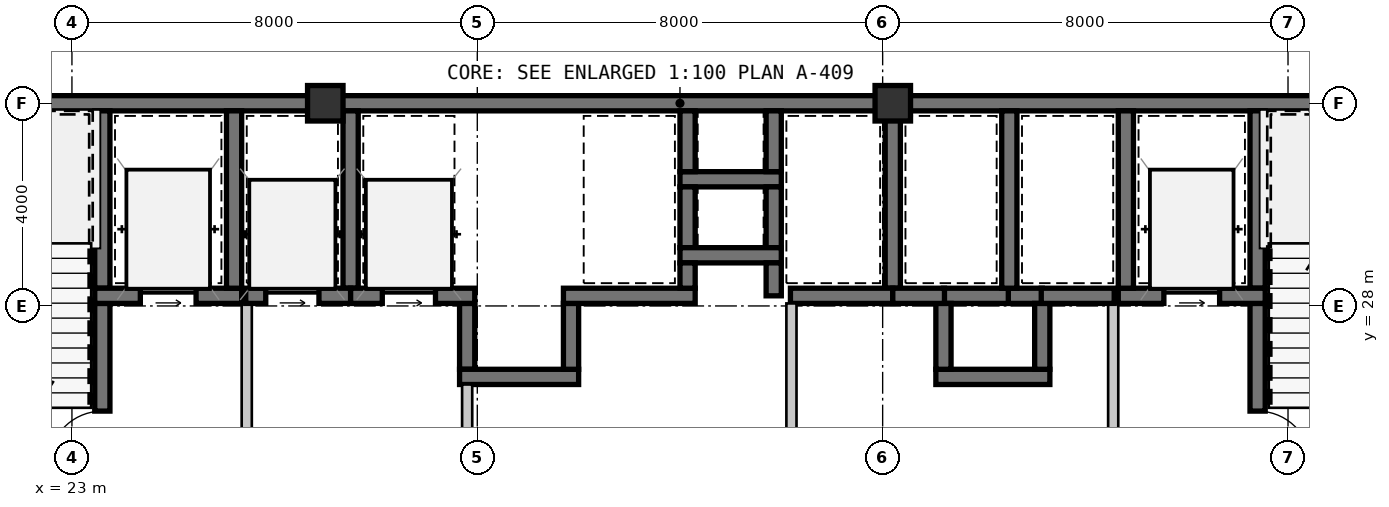
"""IFC4 building model, lengths in metres.
Left out: names, types, materials, properties, quantities, classifications, styles, units other than length and angle.
Written with IfcOpenShell. Run it as: python <this file> out.ifc"""

import sys

from ifc_helpers import new_model, si_unit, direction, frame, frame_2d, origin, origin_2d, place, context, subcontext, project, spatial, rectangle, extrude, source, transform, mapped, element, fill, save


model = new_model("IFC4")
c1 = context("Model", 3, precision=1e-05, world=origin(), true_north=direction((0.0, 1.0)))
c2 = subcontext(c1, "Body", "Model", "MODEL_VIEW")
j1 = project(units=[si_unit("LENGTHUNIT", "METRE"), si_unit("PLANEANGLEUNIT", "RADIAN")], contexts=[c1])
p1 = place(None, origin())
s1 = spatial("IfcSite", under=j1, at=p1, CompositionType="ELEMENT")
p2 = place(p1, origin())
s2 = spatial("IfcBuilding", under=s1, at=p2, CompositionType="ELEMENT")
p3 = place(p2, frame((0.0, 0.0, 106.05)))
s3 = spatial("IfcBuildingStorey", under=s2, at=p3, CompositionType="ELEMENT", Elevation=106.05)
m1 = source(origin(), c2, "Body", "SweptSolid", [
    extrude(rectangle(XDim=0.7, YDim=0.7, at=origin_2d()), origin(), (0.0, 0.0, 1.0), 3.15),
])
for number, where, z_axis, x_axis in (
    (1, (28.0, 32.0, 0.0), (0.0, 0.0, 1.0), (1.0, 0.0, 0.0)),
    (2, (39.2, 32.0, 0.0), (0.0, 0.0, 1.0), (1.0, 0.0, 0.0)),
):
    element("IfcColumn", number, at=place(p3, frame(where, z_axis=z_axis, x_axis=x_axis)), inside=s3, PredefinedType="COLUMN", context=c2, shape_type="MappedRepresentation", body=[
        mapped(m1, transform((0.0, 0.0, 0.0), scale=1.0)),
    ])
m2 = source(origin(), c2, "Body", "SweptSolid", [
    extrude(rectangle(XDim=9.15, YDim=0.3, at=frame_2d((4.575, 0.0))), origin(), (0.0, 0.0, 1.0), 2.93),
])
p4 = place(p3, frame((18.85, 32.0, 0.0), z_axis=(0.0, 0.0, 1.0), x_axis=(1.0, 0.0, 0.0)))
e3 = element("IfcWall", 3, at=p4, inside=s3, PredefinedType="SHEAR", context=c2, shape_type="MappedRepresentation", body=[
    mapped(m2, transform((0.0, 0.0, 0.0), scale=1.0)),
])
m3 = source(origin(), c2, "Body", "SweptSolid", [
    extrude(rectangle(XDim=11.2, YDim=0.3, at=frame_2d((5.6, 0.0))), origin(), (0.0, 0.0, 1.0), 2.93),
])
p5 = place(p3, frame((28.0, 32.0, 0.0), z_axis=(0.0, 0.0, 1.0), x_axis=(1.0, 0.0, 0.0)))
e4 = element("IfcWall", 4, at=p5, inside=s3, PredefinedType="SHEAR", context=c2, shape_type="MappedRepresentation", body=[
    mapped(m3, transform((0.0, 0.0, 0.0), scale=1.0)),
])
m4 = source(origin(), c2, "Body", "SweptSolid", [
    extrude(rectangle(XDim=11.95, YDim=0.3, at=frame_2d((5.975, 0.0))), origin(), (0.0, 0.0, 1.0), 2.93),
])
p6 = place(p3, frame((39.2, 32.0, 0.0), z_axis=(0.0, 0.0, 1.0), x_axis=(1.0, 0.0, 0.0)))
e5 = element("IfcWall", 5, at=p6, inside=s3, PredefinedType="SHEAR", context=c2, shape_type="MappedRepresentation", body=[
    mapped(m4, transform((0.0, 0.0, 0.0), scale=1.0)),
])
m5 = source(origin(), c2, "Body", "SweptSolid", [
    extrude(rectangle(XDim=3.5, YDim=0.3, at=frame_2d((1.75, 0.0))), origin(), (0.0, 0.0, 1.0), 2.93),
])
p7 = place(p3, frame((23.6, 28.35, 0.0), z_axis=(0.0, 0.0, 1.0), x_axis=(0.0, 1.0, 0.0)))
e6 = element("IfcWall", 6, at=p7, inside=s3, PredefinedType="SHEAR", context=c2, shape_type="MappedRepresentation", body=[
    mapped(m5, transform((0.0, 0.0, 0.0), scale=1.0)),
])
m6 = source(origin(), c2, "Body", "SweptSolid", [
    extrude(rectangle(XDim=3.9, YDim=0.3, at=frame_2d((1.95, 0.0))), origin(), (0.0, 0.0, 1.0), 2.93),
])
p8 = place(p3, frame((23.6, 24.15, 0.0), z_axis=(0.0, 0.0, 1.0), x_axis=(0.0, 1.0, 0.0)))
e7 = element("IfcWall", 7, at=p8, inside=s3, PredefinedType="SHEAR", context=c2, shape_type="MappedRepresentation", body=[
    mapped(m6, transform((0.0, 0.0, 0.0), scale=1.0)),
])
m7 = source(origin(), c2, "Body", "SweptSolid", [
    extrude(rectangle(XDim=1.05, YDim=2.1, at=frame_2d((0.525, 1.05))), frame((0.0, 0.16, 0.0), z_axis=(0.0, -1.0, 0.0), x_axis=(1.0, 0.0, 0.0)), (0.0, 0.0, 1.0), 0.32),
])
p9 = place(p8, frame((0.725, 0.0, 0.0)))
e8 = element("IfcOpeningElement", 8, at=p9, cuts=e7, PredefinedType="OPENING", context=c2, shape_type="MappedRepresentation", body=[
    mapped(m7, transform((0.0, 0.0, 0.0), scale=1.0)),
])
m8 = source(origin(), c2, "Body", "SweptSolid", [
    extrude(rectangle(XDim=2.9, YDim=0.3, at=frame_2d((1.45, 0.0))), origin(), (0.0, 0.0, 1.0), 2.93),
])
p10 = place(p3, frame((23.45, 28.2, 0.0), z_axis=(0.0, 0.0, 1.0), x_axis=(1.0, 0.0, 0.0)))
e9 = element("IfcWall", 9, at=p10, inside=s3, PredefinedType="SHEAR", context=c2, shape_type="MappedRepresentation", body=[
    mapped(m8, transform((0.0, 0.0, 0.0), scale=1.0)),
])
m9 = source(origin(), c2, "Body", "SweptSolid", [
    extrude(rectangle(XDim=1.1, YDim=2.15, at=frame_2d((0.55, 1.075))), frame((0.0, 0.16, 0.0), z_axis=(0.0, -1.0, 0.0), x_axis=(1.0, 0.0, 0.0)), (0.0, 0.0, 1.0), 0.32),
])
p11 = place(p10, frame((0.9, 0.0, 0.0)))
e10 = element("IfcOpeningElement", 10, at=p11, cuts=e9, PredefinedType="OPENING", context=c2, shape_type="MappedRepresentation", body=[
    mapped(m9, transform((0.0, 0.0, 0.0), scale=1.0)),
])
p12 = place(p3, frame((26.2, 28.35, 0.0), z_axis=(0.0, 0.0, 1.0), x_axis=(0.0, 1.0, 0.0)))
e11 = element("IfcWall", 11, at=p12, inside=s3, PredefinedType="SHEAR", context=c2, shape_type="MappedRepresentation", body=[
    mapped(m5, transform((0.0, 0.0, 0.0), scale=1.0)),
])
m10 = source(origin(), c2, "Body", "SweptSolid", [
    extrude(rectangle(XDim=3.95, YDim=0.2, at=frame_2d((1.975, 0.0))), origin(), (0.0, 0.0, 1.0), 2.93),
])
p13 = place(p3, frame((26.45, 24.1, 0.0), z_axis=(0.0, 0.0, 1.0), x_axis=(0.0, 1.0, 0.0)))
e12 = element("IfcWall", 12, at=p13, inside=s3, PredefinedType="SOLIDWALL", context=c2, shape_type="MappedRepresentation", body=[
    mapped(m10, transform((0.0, 0.0, 0.0), scale=1.0)),
])
p14 = place(p3, frame((46.4, 31.85, 0.0), z_axis=(0.0, 0.0, 1.0), x_axis=(0.0, -1.0, 0.0)))
e13 = element("IfcWall", 13, at=p14, inside=s3, PredefinedType="SHEAR", context=c2, shape_type="MappedRepresentation", body=[
    mapped(m5, transform((0.0, 0.0, 0.0), scale=1.0)),
])
p15 = place(p3, frame((46.4, 28.05, 0.0), z_axis=(0.0, 0.0, 1.0), x_axis=(0.0, -1.0, 0.0)))
e14 = element("IfcWall", 14, at=p15, inside=s3, PredefinedType="SHEAR", context=c2, shape_type="MappedRepresentation", body=[
    mapped(m6, transform((0.0, 0.0, 0.0), scale=1.0)),
])
p16 = place(p15, frame((2.125, 0.0, 0.0)))
e15 = element("IfcOpeningElement", 15, at=p16, cuts=e14, PredefinedType="OPENING", context=c2, shape_type="MappedRepresentation", body=[
    mapped(m7, transform((0.0, 0.0, 0.0), scale=1.0)),
])
p17 = place(p3, frame((43.65, 28.2, 0.0), z_axis=(0.0, 0.0, 1.0), x_axis=(1.0, 0.0, 0.0)))
e16 = element("IfcWall", 16, at=p17, inside=s3, PredefinedType="SHEAR", context=c2, shape_type="MappedRepresentation", body=[
    mapped(m8, transform((0.0, 0.0, 0.0), scale=1.0)),
])
p18 = place(p17, frame((0.9, 0.0, 0.0)))
e17 = element("IfcOpeningElement", 17, at=p18, cuts=e16, PredefinedType="OPENING", context=c2, shape_type="MappedRepresentation", body=[
    mapped(m9, transform((0.0, 0.0, 0.0), scale=1.0)),
])
p19 = place(p3, frame((43.8, 31.85, 0.0), z_axis=(0.0, 0.0, 1.0), x_axis=(0.0, -1.0, 0.0)))
e18 = element("IfcWall", 18, at=p19, inside=s3, PredefinedType="SHEAR", context=c2, shape_type="MappedRepresentation", body=[
    mapped(m5, transform((0.0, 0.0, 0.0), scale=1.0)),
])
p20 = place(p3, frame((43.55, 28.05, 0.0), z_axis=(0.0, 0.0, 1.0), x_axis=(0.0, -1.0, 0.0)))
e19 = element("IfcWall", 19, at=p20, inside=s3, PredefinedType="SOLIDWALL", context=c2, shape_type="MappedRepresentation", body=[
    mapped(m10, transform((0.0, 0.0, 0.0), scale=1.0)),
])
m11 = source(origin(), c2, "Body", "SweptSolid", [
    extrude(rectangle(XDim=2.0, YDim=0.3, at=frame_2d((1.0, 0.0))), origin(), (0.0, 0.0, 1.0), 2.93),
])
p21 = place(p3, frame((35.0, 30.5, 0.0), z_axis=(0.0, 0.0, 1.0), x_axis=(1.0, 0.0, 0.0)))
e20 = element("IfcWall", 20, at=p21, inside=s3, PredefinedType="SHEAR", context=c2, shape_type="MappedRepresentation", body=[
    mapped(m11, transform((0.0, 0.0, 0.0), scale=1.0)),
])
m12 = source(origin(), c2, "Body", "SweptSolid", [
    extrude(rectangle(XDim=1.2, YDim=0.3, at=frame_2d((0.6, 0.0))), origin(), (0.0, 0.0, 1.0), 2.93),
])
for number, where, z_axis, x_axis in (
    (21, (35.15, 31.85, 0.0), (0.0, 0.0, 1.0), (0.0, -1.0, 0.0)),
    (22, (36.85, 30.65, 0.0), (0.0, 0.0, 1.0), (0.0, 1.0, 0.0)),
    (23, (35.15, 30.35, 0.0), (0.0, 0.0, 1.0), (0.0, -1.0, 0.0)),
    (24, (36.85, 29.15, 0.0), (0.0, 0.0, 1.0), (0.0, 1.0, 0.0)),
):
    element("IfcWall", number, at=place(p3, frame(where, z_axis=z_axis, x_axis=x_axis)), inside=s3, PredefinedType="SHEAR", context=c2, shape_type="MappedRepresentation", body=[
        mapped(m12, transform((0.0, 0.0, 0.0), scale=1.0)),
    ])
p22 = place(p3, frame((35.0, 29.0, 0.0), z_axis=(0.0, 0.0, 1.0), x_axis=(1.0, 0.0, 0.0)))
e25 = element("IfcWall", 25, at=p22, inside=s3, PredefinedType="SHEAR", context=c2, shape_type="MappedRepresentation", body=[
    mapped(m11, transform((0.0, 0.0, 0.0), scale=1.0)),
])
m13 = source(origin(), c2, "Body", "SweptSolid", [
    extrude(rectangle(XDim=1.3, YDim=0.3, at=frame_2d((0.65, 0.0))), origin(), (0.0, 0.0, 1.0), 2.93),
])
p23 = place(p3, frame((30.8, 28.05, 0.0), z_axis=(0.0, 0.0, 1.0), x_axis=(0.0, -1.0, 0.0)))
e26 = element("IfcWall", 26, at=p23, inside=s3, PredefinedType="SHEAR", context=c2, shape_type="MappedRepresentation", body=[
    mapped(m13, transform((0.0, 0.0, 0.0), scale=1.0)),
])
m14 = source(origin(), c2, "Body", "SweptSolid", [
    extrude(rectangle(XDim=2.35, YDim=0.3, at=frame_2d((1.175, 0.0))), origin(), (0.0, 0.0, 1.0), 2.93),
])
p24 = place(p3, frame((30.65, 26.6, 0.0), z_axis=(0.0, 0.0, 1.0), x_axis=(1.0, 0.0, 0.0)))
e27 = element("IfcWall", 27, at=p24, inside=s3, PredefinedType="SHEAR", context=c2, shape_type="MappedRepresentation", body=[
    mapped(m14, transform((0.0, 0.0, 0.0), scale=1.0)),
])
p25 = place(p3, frame((32.85, 26.75, 0.0), z_axis=(0.0, 0.0, 1.0), x_axis=(0.0, 1.0, 0.0)))
e28 = element("IfcWall", 28, at=p25, inside=s3, PredefinedType="SHEAR", context=c2, shape_type="MappedRepresentation", body=[
    mapped(m13, transform((0.0, 0.0, 0.0), scale=1.0)),
])
m15 = source(origin(), c2, "Body", "SweptSolid", [
    extrude(rectangle(XDim=1.32, YDim=0.3, at=frame_2d((0.66, 0.0))), origin(), (0.0, 0.0, 1.0), 2.93),
])
p26 = place(p3, frame((41.52, 28.2, 0.0), z_axis=(0.0, 0.0, 1.0), x_axis=(-1.0, 0.0, 0.0)))
e29 = element("IfcWall", 29, at=p26, inside=s3, PredefinedType="SHEAR", context=c2, shape_type="MappedRepresentation", body=[
    mapped(m15, transform((0.0, 0.0, 0.0), scale=1.0)),
])
m16 = source(origin(), c2, "Body", "SweptSolid", [
    extrude(rectangle(XDim=0.67, YDim=0.3, at=frame_2d((0.335, 0.0))), origin(), (0.0, 0.0, 1.0), 2.93),
])
p27 = place(p3, frame((42.15, 28.2, 0.0), z_axis=(0.0, 0.0, 1.0), x_axis=(-1.0, 0.0, 0.0)))
e30 = element("IfcWall", 30, at=p27, inside=s3, PredefinedType="SHEAR", context=c2, shape_type="MappedRepresentation", body=[
    mapped(m16, transform((0.0, 0.0, 0.0), scale=1.0)),
])
m17 = source(origin(), c2, "Body", "SweptSolid", [
    extrude(rectangle(XDim=2.25, YDim=0.3, at=frame_2d((1.125, 0.0))), origin(), (0.0, 0.0, 1.0), 2.93),
])
p28 = place(p3, frame((40.05, 26.6, 0.0), z_axis=(0.0, 0.0, 1.0), x_axis=(1.0, 0.0, 0.0)))
e31 = element("IfcWall", 31, at=p28, inside=s3, PredefinedType="SHEAR", context=c2, shape_type="MappedRepresentation", body=[
    mapped(m17, transform((0.0, 0.0, 0.0), scale=1.0)),
])
for number, where, z_axis, x_axis in (
    (32, (40.2, 28.05, 0.0), (0.0, 0.0, 1.0), (0.0, -1.0, 0.0)),
    (33, (42.15, 26.75, 0.0), (0.0, 0.0, 1.0), (0.0, 1.0, 0.0)),
):
    element("IfcWall", number, at=place(p3, frame(where, z_axis=z_axis, x_axis=x_axis)), inside=s3, PredefinedType="SHEAR", context=c2, shape_type="MappedRepresentation", body=[
        mapped(m13, transform((0.0, 0.0, 0.0), scale=1.0)),
    ])
p29 = place(p3, frame((28.5, 28.35, 0.0), z_axis=(0.0, 0.0, 1.0), x_axis=(0.0, 1.0, 0.0)))
e34 = element("IfcWall", 34, at=p29, inside=s3, PredefinedType="SHEAR", context=c2, shape_type="MappedRepresentation", body=[
    mapped(m5, transform((0.0, 0.0, 0.0), scale=1.0)),
])
m18 = source(origin(), c2, "Body", "SweptSolid", [
    extrude(rectangle(XDim=2.07, YDim=0.3, at=frame_2d((1.035, 0.0))), origin(), (0.0, 0.0, 1.0), 2.93),
])
p30 = place(p3, frame((26.43, 28.2, 0.0), z_axis=(0.0, 0.0, 1.0), x_axis=(1.0, 0.0, 0.0)))
e35 = element("IfcWall", 35, at=p30, inside=s3, PredefinedType="SHEAR", context=c2, shape_type="MappedRepresentation", body=[
    mapped(m18, transform((0.0, 0.0, 0.0), scale=1.0)),
])
m19 = source(origin(), c2, "Body", "SweptSolid", [
    extrude(rectangle(XDim=1.05, YDim=2.15, at=frame_2d((0.525, 1.075))), frame((0.0, 0.16, 0.0), z_axis=(0.0, -1.0, 0.0), x_axis=(1.0, 0.0, 0.0)), (0.0, 0.0, 1.0), 0.32),
])
p31 = place(p30, frame((0.395, 0.0, 0.0)))
e36 = element("IfcOpeningElement", 36, at=p31, cuts=e35, PredefinedType="OPENING", context=c2, shape_type="MappedRepresentation", body=[
    mapped(m19, transform((0.0, 0.0, 0.0), scale=1.0)),
])
m20 = source(origin(), c2, "Body", "SweptSolid", [
    extrude(rectangle(XDim=2.45, YDim=0.3, at=frame_2d((1.225, 0.0))), origin(), (0.0, 0.0, 1.0), 2.93),
])
p32 = place(p3, frame((28.5, 28.2, 0.0), z_axis=(0.0, 0.0, 1.0), x_axis=(1.0, 0.0, 0.0)))
e37 = element("IfcWall", 37, at=p32, inside=s3, PredefinedType="SHEAR", context=c2, shape_type="MappedRepresentation", body=[
    mapped(m20, transform((0.0, 0.0, 0.0), scale=1.0)),
])
p33 = place(p32, frame((0.625, 0.0, 0.0)))
e38 = element("IfcOpeningElement", 38, at=p33, cuts=e37, PredefinedType="OPENING", context=c2, shape_type="MappedRepresentation", body=[
    mapped(m19, transform((0.0, 0.0, 0.0), scale=1.0)),
])
m21 = source(origin(), c2, "Body", "SweptSolid", [
    extrude(rectangle(XDim=2.35, YDim=0.2, at=frame_2d((1.175, 0.0))), origin(), (0.0, 0.0, 1.0), 2.93),
])
p34 = place(p3, frame((30.8, 26.45, 0.0), z_axis=(0.0, 0.0, 1.0), x_axis=(0.0, -1.0, 0.0)))
e39 = element("IfcWall", 39, at=p34, inside=s3, PredefinedType="SOLIDWALL", context=c2, shape_type="MappedRepresentation", body=[
    mapped(m21, transform((0.0, 0.0, 0.0), scale=1.0)),
])
m22 = source(origin(), c2, "Body", "SweptSolid", [
    extrude(rectangle(XDim=2.6, YDim=0.3, at=frame_2d((1.3, 0.0))), origin(), (0.0, 0.0, 1.0), 2.93),
])
p35 = place(p3, frame((32.7, 28.2, 0.0), z_axis=(0.0, 0.0, 1.0), x_axis=(1.0, 0.0, 0.0)))
e40 = element("IfcWall", 40, at=p35, inside=s3, PredefinedType="SHEAR", context=c2, shape_type="MappedRepresentation", body=[
    mapped(m22, transform((0.0, 0.0, 0.0), scale=1.0)),
])
m23 = source(origin(), c2, "Body", "SweptSolid", [
    extrude(rectangle(XDim=0.5, YDim=0.3, at=frame_2d((0.25, 0.0))), origin(), (0.0, 0.0, 1.0), 2.93),
])
p36 = place(p3, frame((35.15, 28.35, 0.0), z_axis=(0.0, 0.0, 1.0), x_axis=(0.0, 1.0, 0.0)))
e41 = element("IfcWall", 41, at=p36, inside=s3, PredefinedType="SHEAR", context=c2, shape_type="MappedRepresentation", body=[
    mapped(m23, transform((0.0, 0.0, 0.0), scale=1.0)),
])
p37 = place(p3, frame((39.2, 28.35, 0.0), z_axis=(0.0, 0.0, 1.0), x_axis=(0.0, 1.0, 0.0)))
e42 = element("IfcWall", 42, at=p37, inside=s3, PredefinedType="SHEAR", context=c2, shape_type="MappedRepresentation", body=[
    mapped(m5, transform((0.0, 0.0, 0.0), scale=1.0)),
])
m24 = source(origin(), c2, "Body", "SweptSolid", [
    extrude(rectangle(XDim=0.65, YDim=0.3, at=frame_2d((0.325, 0.0))), origin(), (0.0, 0.0, 1.0), 2.93),
])
p38 = place(p3, frame((36.85, 28.85, 0.0), z_axis=(0.0, 0.0, 1.0), x_axis=(0.0, -1.0, 0.0)))
e43 = element("IfcWall", 43, at=p38, inside=s3, PredefinedType="SHEAR", context=c2, shape_type="MappedRepresentation", body=[
    mapped(m24, transform((0.0, 0.0, 0.0), scale=1.0)),
])
m25 = source(origin(), c2, "Body", "SweptSolid", [
    extrude(rectangle(XDim=2.02, YDim=0.3, at=frame_2d((1.01, 0.0))), origin(), (0.0, 0.0, 1.0), 2.93),
])
p39 = place(p3, frame((37.18, 28.2, 0.0), z_axis=(0.0, 0.0, 1.0), x_axis=(1.0, 0.0, 0.0)))
e44 = element("IfcWall", 44, at=p39, inside=s3, PredefinedType="SHEAR", context=c2, shape_type="MappedRepresentation", body=[
    mapped(m25, transform((0.0, 0.0, 0.0), scale=1.0)),
])
p40 = place(p3, frame((41.5, 28.35, 0.0), z_axis=(0.0, 0.0, 1.0), x_axis=(0.0, 1.0, 0.0)))
e45 = element("IfcWall", 45, at=p40, inside=s3, PredefinedType="SHEAR", context=c2, shape_type="MappedRepresentation", body=[
    mapped(m5, transform((0.0, 0.0, 0.0), scale=1.0)),
])
m26 = source(origin(), c2, "Body", "SweptSolid", [
    extrude(rectangle(XDim=1.02, YDim=0.3, at=frame_2d((0.51, 0.0))), origin(), (0.0, 0.0, 1.0), 2.93),
])
p41 = place(p3, frame((39.2, 28.2, 0.0), z_axis=(0.0, 0.0, 1.0), x_axis=(1.0, 0.0, 0.0)))
e46 = element("IfcWall", 46, at=p41, inside=s3, PredefinedType="SHEAR", context=c2, shape_type="MappedRepresentation", body=[
    mapped(m26, transform((0.0, 0.0, 0.0), scale=1.0)),
])
m27 = source(origin(), c2, "Body", "SweptSolid", [
    extrude(rectangle(XDim=1.44, YDim=0.3, at=frame_2d((0.72, 0.0))), origin(), (0.0, 0.0, 1.0), 2.93),
])
p42 = place(p3, frame((42.13, 28.2, 0.0), z_axis=(0.0, 0.0, 1.0), x_axis=(1.0, 0.0, 0.0)))
e47 = element("IfcWall", 47, at=p42, inside=s3, PredefinedType="SHEAR", context=c2, shape_type="MappedRepresentation", body=[
    mapped(m27, transform((0.0, 0.0, 0.0), scale=1.0)),
])
p43 = place(p3, frame((37.2, 28.05, 0.0), z_axis=(0.0, 0.0, 1.0), x_axis=(0.0, -1.0, 0.0)))
e48 = element("IfcWall", 48, at=p43, inside=s3, PredefinedType="SOLIDWALL", context=c2, shape_type="MappedRepresentation", body=[
    mapped(m10, transform((0.0, 0.0, 0.0), scale=1.0)),
])
m28 = source(origin(), c2, "Body", "SweptSolid", [
    extrude(rectangle(XDim=1.05, YDim=2.1, at=frame_2d((0.525, 1.05))), frame((0.0, 0.025, 0.0), z_axis=(0.0, -1.0, 0.0), x_axis=(1.0, 0.0, 0.0)), (0.0, 0.0, 1.0), 0.05),
])
p44 = place(p9, origin())
e49 = element("IfcDoor", 49, at=p44, inside=s3, OperationType="SINGLE_SWING_LEFT", PredefinedType="DOOR", context=c2, shape_type="MappedRepresentation", body=[
    mapped(m28, transform((0.0, 0.0, 0.0), scale=1.0)),
])
fill(e8, e49)
m29 = source(origin(), c2, "Body", "SweptSolid", [
    extrude(rectangle(XDim=1.1, YDim=2.15, at=frame_2d((0.55, 1.075))), frame((0.0, 0.025, 0.0), z_axis=(0.0, -1.0, 0.0), x_axis=(1.0, 0.0, 0.0)), (0.0, 0.0, 1.0), 0.05),
])
p45 = place(p11, origin())
e50 = element("IfcDoor", 50, at=p45, inside=s3, OperationType="SLIDING_TO_LEFT", PredefinedType="DOOR", context=c2, shape_type="MappedRepresentation", body=[
    mapped(m29, transform((0.0, 0.0, 0.0), scale=1.0)),
])
fill(e10, e50)
p46 = place(p16, origin())
e51 = element("IfcDoor", 51, at=p46, inside=s3, OperationType="SINGLE_SWING_RIGHT", PredefinedType="DOOR", context=c2, shape_type="MappedRepresentation", body=[
    mapped(m28, transform((0.0, 0.0, 0.0), scale=1.0)),
])
fill(e15, e51)
p47 = place(p18, origin())
e52 = element("IfcDoor", 52, at=p47, inside=s3, OperationType="SLIDING_TO_LEFT", PredefinedType="DOOR", context=c2, shape_type="MappedRepresentation", body=[
    mapped(m29, transform((0.0, 0.0, 0.0), scale=1.0)),
])
fill(e17, e52)
m30 = source(origin(), c2, "Body", "SweptSolid", [
    extrude(rectangle(XDim=1.05, YDim=2.15, at=frame_2d((0.525, 1.075))), frame((0.0, 0.025, 0.0), z_axis=(0.0, -1.0, 0.0), x_axis=(1.0, 0.0, 0.0)), (0.0, 0.0, 1.0), 0.05),
])
p48 = place(p31, origin())
e53 = element("IfcDoor", 53, at=p48, inside=s3, OperationType="SLIDING_TO_LEFT", PredefinedType="DOOR", context=c2, shape_type="MappedRepresentation", body=[
    mapped(m30, transform((0.0, 0.0, 0.0), scale=1.0)),
])
fill(e36, e53)
p49 = place(p33, origin())
e54 = element("IfcDoor", 54, at=p49, inside=s3, OperationType="SLIDING_TO_LEFT", PredefinedType="DOOR", context=c2, shape_type="MappedRepresentation", body=[
    mapped(m30, transform((0.0, 0.0, 0.0), scale=1.0)),
])
fill(e38, e54)
save(model, sys.argv[1])
